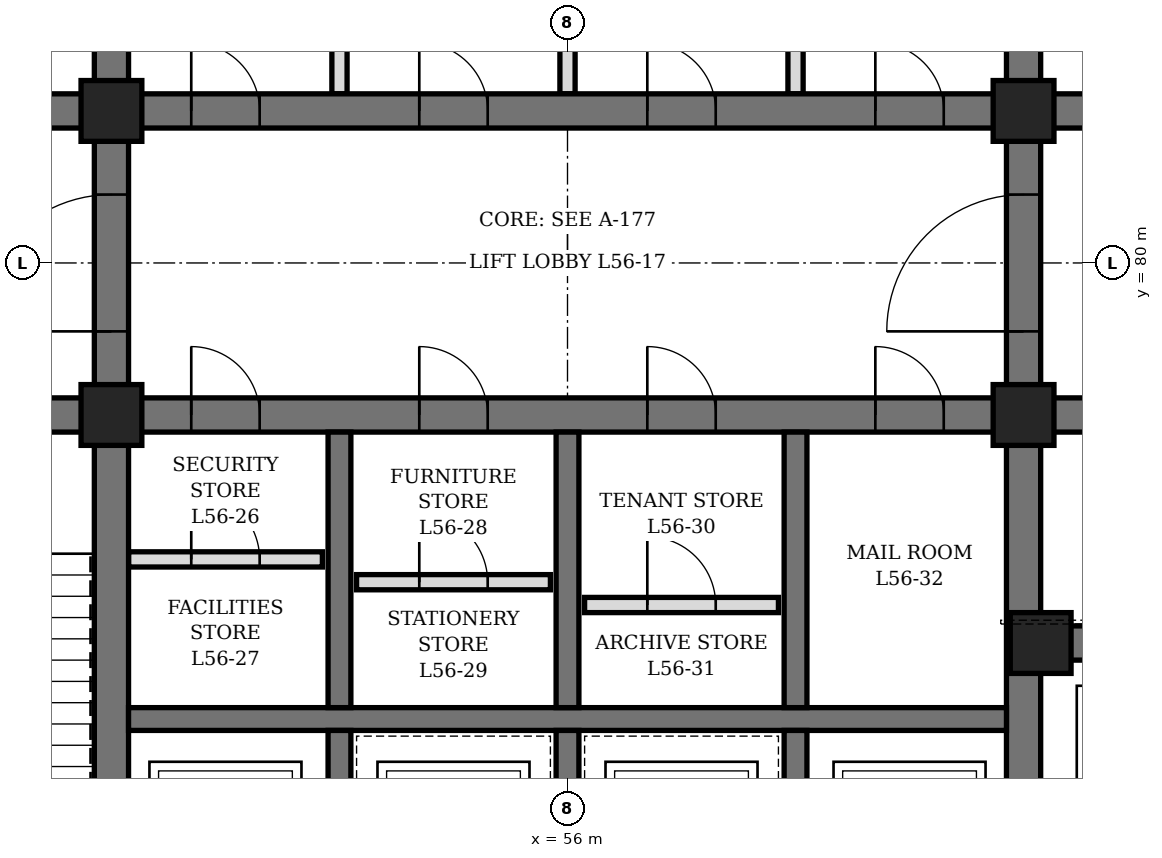
"""IFC4 building model, lengths in metres.
Left out: names, types, materials, properties, quantities, classifications, styles, units other than length and angle.
Written with IfcOpenShell. Run it as: python <this file> out.ifc"""

import sys

from ifc_helpers import new_model, si_unit, direction, frame, frame_2d, origin, origin_2d, place, context, subcontext, project, spatial, rectangle, hollow_rectangle, extrude, element, fill, save


model = new_model("IFC4")
c1 = context("Model", 3, precision=1e-05, world=origin(), true_north=direction((0.0, 1.0)))
c2 = subcontext(c1, "Body", "Model", "MODEL_VIEW")
j1 = project(units=[si_unit("LENGTHUNIT", "METRE"), si_unit("PLANEANGLEUNIT", "RADIAN")], contexts=[c1])
p1 = place(None, origin())
s1 = spatial("IfcSite", under=j1, at=p1, CompositionType="ELEMENT")
p2 = place(p1, origin())
s2 = spatial("IfcBuilding", under=s1, at=p2, CompositionType="ELEMENT")
p3 = place(p2, frame((0.0, 0.0, 250.3)))
s3 = spatial("IfcBuildingStorey", under=s2, at=p3, CompositionType="ELEMENT", Elevation=250.3)
p4 = place(p3, frame((50.0, 71.6, 0.0), z_axis=(0.0, 0.0, 1.0), x_axis=(0.0, 1.0, 0.0)))
e1 = element("IfcWall", 1, at=p4, inside=s3, PredefinedType="SHEAR", context=c2, shape_type="SweptSolid", body=[
    extrude(rectangle(XDim=16.8, YDim=0.45, at=frame_2d((8.4, 0.0))), origin(), (0.0, 0.0, 1.0), 4.2),
])
p5 = place(p4, frame((7.5, 0.0, 0.0)))
e2 = element("IfcOpeningElement", 2, at=p5, cuts=e1, PredefinedType="OPENING", context=c2, shape_type="SweptSolid", body=[
    extrude(rectangle(XDim=1.8, YDim=2.4, at=frame_2d((0.9, 1.2))), frame((0.0, 0.235, 0.0), z_axis=(0.0, -1.0, 0.0), x_axis=(1.0, 0.0, 0.0)), (0.0, 0.0, 1.0), 0.47),
])
p6 = place(p3, frame((62.0, 71.6, 0.0), z_axis=(0.0, 0.0, 1.0), x_axis=(0.0, 1.0, 0.0)))
e3 = element("IfcWall", 3, at=p6, inside=s3, PredefinedType="SHEAR", context=c2, shape_type="SweptSolid", body=[
    extrude(rectangle(XDim=16.8, YDim=0.45, at=frame_2d((8.4, 0.0))), origin(), (0.0, 0.0, 1.0), 4.2),
])
p7 = place(p6, frame((7.5, 0.0, 0.0)))
e4 = element("IfcOpeningElement", 4, at=p7, cuts=e3, PredefinedType="OPENING", context=c2, shape_type="SweptSolid", body=[
    extrude(rectangle(XDim=1.8, YDim=2.4, at=frame_2d((0.9, 1.2))), frame((0.0, 0.235, 0.0), z_axis=(0.0, -1.0, 0.0), x_axis=(1.0, 0.0, 0.0)), (0.0, 0.0, 1.0), 0.47),
])
p8 = place(p3, frame((44.6, 78.0, 0.0), z_axis=(0.0, 0.0, 1.0), x_axis=(1.0, 0.0, 0.0)))
e5 = element("IfcWall", 5, at=p8, inside=s3, PredefinedType="SHEAR", context=c2, shape_type="SweptSolid", body=[
    extrude(rectangle(XDim=5.175, YDim=0.45, at=frame_2d((2.587, 0.0))), origin(), (0.0, 0.0, 1.0), 4.2),
])
p9 = place(p8, frame((1.8, 0.0, 0.0)))
e6 = element("IfcOpeningElement", 6, at=p9, cuts=e5, PredefinedType="OPENING", context=c2, shape_type="SweptSolid", body=[
    extrude(rectangle(XDim=1.2, YDim=2.1, at=frame_2d((0.6, 1.05))), frame((0.0, 0.235, 0.0), z_axis=(0.0, -1.0, 0.0), x_axis=(1.0, 0.0, 0.0)), (0.0, 0.0, 1.0), 0.47),
])
p10 = place(p3, frame((44.6, 82.0, 0.0), z_axis=(0.0, 0.0, 1.0), x_axis=(1.0, 0.0, 0.0)))
e7 = element("IfcWall", 7, at=p10, inside=s3, PredefinedType="SHEAR", context=c2, shape_type="SweptSolid", body=[
    extrude(rectangle(XDim=5.175, YDim=0.45, at=frame_2d((2.587, 0.0))), origin(), (0.0, 0.0, 1.0), 4.2),
])
p11 = place(p10, frame((0.7, 0.0, 0.0)))
e8 = element("IfcOpeningElement", 8, at=p11, cuts=e7, PredefinedType="OPENING", context=c2, shape_type="SweptSolid", body=[
    extrude(rectangle(XDim=0.9, YDim=2.1, at=frame_2d((0.45, 1.05))), frame((0.0, 0.235, 0.0), z_axis=(0.0, -1.0, 0.0), x_axis=(1.0, 0.0, 0.0)), (0.0, 0.0, 1.0), 0.47),
])
p12 = place(p3, frame((62.225, 75.0, 0.0), z_axis=(0.0, 0.0, 1.0), x_axis=(1.0, 0.0, 0.0)))
e9 = element("IfcWall", 9, at=p12, inside=s3, PredefinedType="SHEAR", context=c2, shape_type="SweptSolid", body=[
    extrude(rectangle(XDim=5.175, YDim=0.45, at=frame_2d((2.587, 0.0))), origin(), (0.0, 0.0, 1.0), 4.2),
])
p13 = place(p12, frame((0.675, 0.0, 0.0)))
e10 = element("IfcOpeningElement", 10, at=p13, cuts=e9, PredefinedType="OPENING", context=c2, shape_type="SweptSolid", body=[
    extrude(rectangle(XDim=1.2, YDim=2.2, at=frame_2d((0.6, 1.1))), frame((0.0, 0.235, 0.0), z_axis=(0.0, -1.0, 0.0), x_axis=(1.0, 0.0, 0.0)), (0.0, 0.0, 1.0), 0.47),
])
p14 = place(p12, frame((3.425, 0.0, 0.0)))
e11 = element("IfcOpeningElement", 11, at=p14, cuts=e9, PredefinedType="OPENING", context=c2, shape_type="SweptSolid", body=[
    extrude(rectangle(XDim=1.2, YDim=2.2, at=frame_2d((0.6, 1.1))), frame((0.0, 0.235, 0.0), z_axis=(0.0, -1.0, 0.0), x_axis=(1.0, 0.0, 0.0)), (0.0, 0.0, 1.0), 0.47),
])
p15 = place(p3, frame((62.225, 78.0, 0.0), z_axis=(0.0, 0.0, 1.0), x_axis=(1.0, 0.0, 0.0)))
e12 = element("IfcWall", 12, at=p15, inside=s3, PredefinedType="SHEAR", context=c2, shape_type="SweptSolid", body=[
    extrude(rectangle(XDim=5.175, YDim=0.45, at=frame_2d((2.587, 0.0))), origin(), (0.0, 0.0, 1.0), 4.2),
])
p16 = place(p15, frame((2.175, 0.0, 0.0)))
e13 = element("IfcOpeningElement", 13, at=p16, cuts=e12, PredefinedType="OPENING", context=c2, shape_type="SweptSolid", body=[
    extrude(rectangle(XDim=1.2, YDim=2.1, at=frame_2d((0.6, 1.05))), frame((0.0, 0.235, 0.0), z_axis=(0.0, -1.0, 0.0), x_axis=(1.0, 0.0, 0.0)), (0.0, 0.0, 1.0), 0.47),
])
p17 = place(p3, frame((62.225, 82.0, 0.0), z_axis=(0.0, 0.0, 1.0), x_axis=(1.0, 0.0, 0.0)))
e14 = element("IfcWall", 14, at=p17, inside=s3, PredefinedType="SHEAR", context=c2, shape_type="SweptSolid", body=[
    extrude(rectangle(XDim=5.175, YDim=0.45, at=frame_2d((2.587, 0.0))), origin(), (0.0, 0.0, 1.0), 4.2),
])
p18 = place(p17, frame((2.175, 0.0, 0.0)))
e15 = element("IfcOpeningElement", 15, at=p18, cuts=e14, PredefinedType="OPENING", context=c2, shape_type="SweptSolid", body=[
    extrude(rectangle(XDim=1.2, YDim=2.1, at=frame_2d((0.6, 1.05))), frame((0.0, 0.235, 0.0), z_axis=(0.0, -1.0, 0.0), x_axis=(1.0, 0.0, 0.0)), (0.0, 0.0, 1.0), 0.47),
])
p19 = place(p3, frame((50.225, 78.0, 0.0), z_axis=(0.0, 0.0, 1.0), x_axis=(1.0, 0.0, 0.0)))
e16 = element("IfcWall", 16, at=p19, inside=s3, PredefinedType="SHEAR", context=c2, shape_type="SweptSolid", body=[
    extrude(rectangle(XDim=11.55, YDim=0.45, at=frame_2d((5.775, 0.0))), origin(), (0.0, 0.0, 1.0), 4.2),
])
p20 = place(p19, frame((0.825, 0.0, 0.0)))
e17 = element("IfcOpeningElement", 17, at=p20, cuts=e16, PredefinedType="OPENING", context=c2, shape_type="SweptSolid", body=[
    extrude(rectangle(XDim=0.9, YDim=2.1, at=frame_2d((0.45, 1.05))), frame((0.0, 0.235, 0.0), z_axis=(0.0, -1.0, 0.0), x_axis=(1.0, 0.0, 0.0)), (0.0, 0.0, 1.0), 0.47),
])
p21 = place(p19, frame((3.825, 0.0, 0.0)))
e18 = element("IfcOpeningElement", 18, at=p21, cuts=e16, PredefinedType="OPENING", context=c2, shape_type="SweptSolid", body=[
    extrude(rectangle(XDim=0.9, YDim=2.1, at=frame_2d((0.45, 1.05))), frame((0.0, 0.235, 0.0), z_axis=(0.0, -1.0, 0.0), x_axis=(1.0, 0.0, 0.0)), (0.0, 0.0, 1.0), 0.47),
])
p22 = place(p19, frame((6.825, 0.0, 0.0)))
e19 = element("IfcOpeningElement", 19, at=p22, cuts=e16, PredefinedType="OPENING", context=c2, shape_type="SweptSolid", body=[
    extrude(rectangle(XDim=0.9, YDim=2.1, at=frame_2d((0.45, 1.05))), frame((0.0, 0.235, 0.0), z_axis=(0.0, -1.0, 0.0), x_axis=(1.0, 0.0, 0.0)), (0.0, 0.0, 1.0), 0.47),
])
p23 = place(p19, frame((9.825, 0.0, 0.0)))
e20 = element("IfcOpeningElement", 20, at=p23, cuts=e16, PredefinedType="OPENING", context=c2, shape_type="SweptSolid", body=[
    extrude(rectangle(XDim=0.9, YDim=2.1, at=frame_2d((0.45, 1.05))), frame((0.0, 0.235, 0.0), z_axis=(0.0, -1.0, 0.0), x_axis=(1.0, 0.0, 0.0)), (0.0, 0.0, 1.0), 0.47),
])
p24 = place(p3, frame((50.225, 82.0, 0.0), z_axis=(0.0, 0.0, 1.0), x_axis=(1.0, 0.0, 0.0)))
e21 = element("IfcWall", 21, at=p24, inside=s3, PredefinedType="SHEAR", context=c2, shape_type="SweptSolid", body=[
    extrude(rectangle(XDim=11.55, YDim=0.45, at=frame_2d((5.775, 0.0))), origin(), (0.0, 0.0, 1.0), 4.2),
])
p25 = place(p24, frame((0.825, 0.0, 0.0)))
e22 = element("IfcOpeningElement", 22, at=p25, cuts=e21, PredefinedType="OPENING", context=c2, shape_type="SweptSolid", body=[
    extrude(rectangle(XDim=0.9, YDim=2.1, at=frame_2d((0.45, 1.05))), frame((0.0, 0.235, 0.0), z_axis=(0.0, -1.0, 0.0), x_axis=(1.0, 0.0, 0.0)), (0.0, 0.0, 1.0), 0.47),
])
p26 = place(p24, frame((3.825, 0.0, 0.0)))
e23 = element("IfcOpeningElement", 23, at=p26, cuts=e21, PredefinedType="OPENING", context=c2, shape_type="SweptSolid", body=[
    extrude(rectangle(XDim=0.9, YDim=2.1, at=frame_2d((0.45, 1.05))), frame((0.0, 0.235, 0.0), z_axis=(0.0, -1.0, 0.0), x_axis=(1.0, 0.0, 0.0)), (0.0, 0.0, 1.0), 0.47),
])
p27 = place(p24, frame((6.825, 0.0, 0.0)))
e24 = element("IfcOpeningElement", 24, at=p27, cuts=e21, PredefinedType="OPENING", context=c2, shape_type="SweptSolid", body=[
    extrude(rectangle(XDim=0.9, YDim=2.1, at=frame_2d((0.45, 1.05))), frame((0.0, 0.235, 0.0), z_axis=(0.0, -1.0, 0.0), x_axis=(1.0, 0.0, 0.0)), (0.0, 0.0, 1.0), 0.47),
])
p28 = place(p24, frame((9.825, 0.0, 0.0)))
e25 = element("IfcOpeningElement", 25, at=p28, cuts=e21, PredefinedType="OPENING", context=c2, shape_type="SweptSolid", body=[
    extrude(rectangle(XDim=0.9, YDim=2.1, at=frame_2d((0.45, 1.05))), frame((0.0, 0.235, 0.0), z_axis=(0.0, -1.0, 0.0), x_axis=(1.0, 0.0, 0.0)), (0.0, 0.0, 1.0), 0.47),
])
p29 = place(p3, frame((50.225, 74.0, 0.0), z_axis=(0.0, 0.0, 1.0), x_axis=(1.0, 0.0, 0.0)))
e26 = element("IfcWall", 26, at=p29, inside=s3, PredefinedType="SHEAR", context=c2, shape_type="SweptSolid", body=[
    extrude(rectangle(XDim=11.55, YDim=0.3, at=frame_2d((5.775, 0.0))), origin(), (0.0, 0.0, 1.0), 4.2),
])
p30 = place(p3, frame((53.0, 71.6, 0.0), z_axis=(0.0, 0.0, 1.0), x_axis=(0.0, 1.0, 0.0)))
e27 = element("IfcWall", 27, at=p30, inside=s3, PredefinedType="SHEAR", context=c2, shape_type="SweptSolid", body=[
    extrude(rectangle(XDim=2.25, YDim=0.3, at=frame_2d((1.125, 0.0))), origin(), (0.0, 0.0, 1.0), 4.2),
])
p31 = place(p3, frame((53.0, 74.15, 0.0), z_axis=(0.0, 0.0, 1.0), x_axis=(0.0, 1.0, 0.0)))
e28 = element("IfcWall", 28, at=p31, inside=s3, PredefinedType="SHEAR", context=c2, shape_type="SweptSolid", body=[
    extrude(rectangle(XDim=3.625, YDim=0.3, at=frame_2d((1.812, 0.0))), origin(), (0.0, 0.0, 1.0), 4.2),
])
p32 = place(p3, frame((56.0, 71.6, 0.0), z_axis=(0.0, 0.0, 1.0), x_axis=(0.0, 1.0, 0.0)))
e29 = element("IfcWall", 29, at=p32, inside=s3, PredefinedType="SHEAR", context=c2, shape_type="SweptSolid", body=[
    extrude(rectangle(XDim=2.25, YDim=0.3, at=frame_2d((1.125, 0.0))), origin(), (0.0, 0.0, 1.0), 4.2),
])
p33 = place(p3, frame((56.0, 74.15, 0.0), z_axis=(0.0, 0.0, 1.0), x_axis=(0.0, 1.0, 0.0)))
e30 = element("IfcWall", 30, at=p33, inside=s3, PredefinedType="SHEAR", context=c2, shape_type="SweptSolid", body=[
    extrude(rectangle(XDim=3.625, YDim=0.3, at=frame_2d((1.812, 0.0))), origin(), (0.0, 0.0, 1.0), 4.2),
])
p34 = place(p3, frame((59.0, 71.6, 0.0), z_axis=(0.0, 0.0, 1.0), x_axis=(0.0, 1.0, 0.0)))
e31 = element("IfcWall", 31, at=p34, inside=s3, PredefinedType="SHEAR", context=c2, shape_type="SweptSolid", body=[
    extrude(rectangle(XDim=2.25, YDim=0.3, at=frame_2d((1.125, 0.0))), origin(), (0.0, 0.0, 1.0), 4.2),
])
p35 = place(p3, frame((59.0, 74.15, 0.0), z_axis=(0.0, 0.0, 1.0), x_axis=(0.0, 1.0, 0.0)))
e32 = element("IfcWall", 32, at=p35, inside=s3, PredefinedType="SHEAR", context=c2, shape_type="SweptSolid", body=[
    extrude(rectangle(XDim=3.625, YDim=0.3, at=frame_2d((1.812, 0.0))), origin(), (0.0, 0.0, 1.0), 4.2),
])
for number, where, z_axis, x_axis in (
    (33, (50.0, 78.0, 0.0), (0.0, 0.0, 1.0), (1.0, 0.0, 0.0)),
    (34, (50.0, 82.0, 0.0), (0.0, 0.0, 1.0), (1.0, 0.0, 0.0)),
    (35, (62.0, 78.0, 0.0), (0.0, 0.0, 1.0), (1.0, 0.0, 0.0)),
    (36, (62.0, 82.0, 0.0), (0.0, 0.0, 1.0), (1.0, 0.0, 0.0)),
    (37, (62.225, 75.0, 0.0), (0.0, 0.0, 1.0), (1.0, 0.0, 0.0)),
):
    element("IfcColumn", number, at=place(p3, frame(where, z_axis=z_axis, x_axis=x_axis)), inside=s3, PredefinedType="COLUMN", context=c2, shape_type="SweptSolid", body=[
        extrude(hollow_rectangle(XDim=0.8, YDim=0.8, WallThickness=0.1, at=origin_2d()), origin(), (0.0, 0.0, 1.0), 4.2),
    ])
p36 = place(p3, frame((50.225, 76.1, 0.0), z_axis=(0.0, 0.0, 1.0), x_axis=(1.0, 0.0, 0.0)))
e38 = element("IfcWall", 38, at=p36, inside=s3, PredefinedType="PARTITIONING", context=c2, shape_type="SweptSolid", body=[
    extrude(rectangle(XDim=2.55, YDim=0.2, at=frame_2d((1.275, 0.0))), origin(), (0.0, 0.0, 1.0), 4.04),
])
p37 = place(p36, frame((0.825, 0.0, 0.0)))
e39 = element("IfcOpeningElement", 39, at=p37, cuts=e38, PredefinedType="OPENING", context=c2, shape_type="SweptSolid", body=[
    extrude(rectangle(XDim=0.9, YDim=2.1, at=frame_2d((0.45, 1.05))), frame((0.0, 0.11, 0.0), z_axis=(0.0, -1.0, 0.0), x_axis=(1.0, 0.0, 0.0)), (0.0, 0.0, 1.0), 0.22),
])
p38 = place(p3, frame((53.225, 75.8, 0.0), z_axis=(0.0, 0.0, 1.0), x_axis=(1.0, 0.0, 0.0)))
e40 = element("IfcWall", 40, at=p38, inside=s3, PredefinedType="PARTITIONING", context=c2, shape_type="SweptSolid", body=[
    extrude(rectangle(XDim=2.55, YDim=0.2, at=frame_2d((1.275, 0.0))), origin(), (0.0, 0.0, 1.0), 4.04),
])
p39 = place(p38, frame((0.825, 0.0, 0.0)))
e41 = element("IfcOpeningElement", 41, at=p39, cuts=e40, PredefinedType="OPENING", context=c2, shape_type="SweptSolid", body=[
    extrude(rectangle(XDim=0.9, YDim=2.1, at=frame_2d((0.45, 1.05))), frame((0.0, 0.11, 0.0), z_axis=(0.0, -1.0, 0.0), x_axis=(1.0, 0.0, 0.0)), (0.0, 0.0, 1.0), 0.22),
])
p40 = place(p3, frame((56.225, 75.5, 0.0), z_axis=(0.0, 0.0, 1.0), x_axis=(1.0, 0.0, 0.0)))
e42 = element("IfcWall", 42, at=p40, inside=s3, PredefinedType="PARTITIONING", context=c2, shape_type="SweptSolid", body=[
    extrude(rectangle(XDim=2.55, YDim=0.2, at=frame_2d((1.275, 0.0))), origin(), (0.0, 0.0, 1.0), 4.04),
])
p41 = place(p40, frame((0.825, 0.0, 0.0)))
e43 = element("IfcOpeningElement", 43, at=p41, cuts=e42, PredefinedType="OPENING", context=c2, shape_type="SweptSolid", body=[
    extrude(rectangle(XDim=0.9, YDim=2.1, at=frame_2d((0.45, 1.05))), frame((0.0, 0.11, 0.0), z_axis=(0.0, -1.0, 0.0), x_axis=(1.0, 0.0, 0.0)), (0.0, 0.0, 1.0), 0.22),
])
p42 = place(p3, frame((53.0, 82.225, 0.0), z_axis=(0.0, 0.0, 1.0), x_axis=(0.0, 1.0, 0.0)))
e44 = element("IfcWall", 44, at=p42, inside=s3, PredefinedType="PARTITIONING", context=c2, shape_type="SweptSolid", body=[
    extrude(rectangle(XDim=3.55, YDim=0.2, at=frame_2d((1.775, 0.0))), origin(), (0.0, 0.0, 1.0), 4.04),
])
p43 = place(p3, frame((56.0, 82.225, 0.0), z_axis=(0.0, 0.0, 1.0), x_axis=(0.0, 1.0, 0.0)))
e45 = element("IfcWall", 45, at=p43, inside=s3, PredefinedType="PARTITIONING", context=c2, shape_type="SweptSolid", body=[
    extrude(rectangle(XDim=3.55, YDim=0.2, at=frame_2d((1.775, 0.0))), origin(), (0.0, 0.0, 1.0), 3.14),
])
p44 = place(p3, frame((59.0, 82.225, 0.0), z_axis=(0.0, 0.0, 1.0), x_axis=(0.0, 1.0, 0.0)))
e46 = element("IfcWall", 46, at=p44, inside=s3, PredefinedType="PARTITIONING", context=c2, shape_type="SweptSolid", body=[
    extrude(rectangle(XDim=3.55, YDim=0.2, at=frame_2d((1.775, 0.0))), origin(), (0.0, 0.0, 1.0), 4.04),
])
p45 = place(p20, origin())
e47 = element("IfcDoor", 47, at=p45, inside=s3, OperationType="SINGLE_SWING_LEFT", PredefinedType="DOOR", context=c2, shape_type="SweptSolid", body=[
    extrude(rectangle(XDim=0.9, YDim=2.1, at=frame_2d((0.45, 1.05))), frame((0.0, 0.225, 0.0), z_axis=(0.0, -1.0, 0.0), x_axis=(1.0, 0.0, 0.0)), (0.0, 0.0, 1.0), 0.449),
])
fill(e17, e47)
p46 = place(p37, origin())
e48 = element("IfcDoor", 48, at=p46, inside=s3, OperationType="SINGLE_SWING_LEFT", PredefinedType="DOOR", context=c2, shape_type="SweptSolid", body=[
    extrude(rectangle(XDim=0.9, YDim=2.1, at=frame_2d((0.45, 1.05))), frame((0.0, 0.1, 0.0), z_axis=(0.0, -1.0, 0.0), x_axis=(1.0, 0.0, 0.0)), (0.0, 0.0, 1.0), 0.199),
])
fill(e39, e48)
p47 = place(p21, origin())
e49 = element("IfcDoor", 49, at=p47, inside=s3, OperationType="SINGLE_SWING_LEFT", PredefinedType="DOOR", context=c2, shape_type="SweptSolid", body=[
    extrude(rectangle(XDim=0.9, YDim=2.1, at=frame_2d((0.45, 1.05))), frame((0.0, 0.225, 0.0), z_axis=(0.0, -1.0, 0.0), x_axis=(1.0, 0.0, 0.0)), (0.0, 0.0, 1.0), 0.449),
])
fill(e18, e49)
p48 = place(p39, origin())
e50 = element("IfcDoor", 50, at=p48, inside=s3, OperationType="SINGLE_SWING_LEFT", PredefinedType="DOOR", context=c2, shape_type="SweptSolid", body=[
    extrude(rectangle(XDim=0.9, YDim=2.1, at=frame_2d((0.45, 1.05))), frame((0.0, 0.1, 0.0), z_axis=(0.0, -1.0, 0.0), x_axis=(1.0, 0.0, 0.0)), (0.0, 0.0, 1.0), 0.199),
])
fill(e41, e50)
p49 = place(p22, origin())
e51 = element("IfcDoor", 51, at=p49, inside=s3, OperationType="SINGLE_SWING_LEFT", PredefinedType="DOOR", context=c2, shape_type="SweptSolid", body=[
    extrude(rectangle(XDim=0.9, YDim=2.1, at=frame_2d((0.45, 1.05))), frame((0.0, 0.225, 0.0), z_axis=(0.0, -1.0, 0.0), x_axis=(1.0, 0.0, 0.0)), (0.0, 0.0, 1.0), 0.449),
])
fill(e19, e51)
p50 = place(p41, origin())
e52 = element("IfcDoor", 52, at=p50, inside=s3, OperationType="SINGLE_SWING_LEFT", PredefinedType="DOOR", context=c2, shape_type="SweptSolid", body=[
    extrude(rectangle(XDim=0.9, YDim=2.1, at=frame_2d((0.45, 1.05))), frame((0.0, 0.1, 0.0), z_axis=(0.0, -1.0, 0.0), x_axis=(1.0, 0.0, 0.0)), (0.0, 0.0, 1.0), 0.199),
])
fill(e43, e52)
p51 = place(p23, origin())
e53 = element("IfcDoor", 53, at=p51, inside=s3, OperationType="SINGLE_SWING_LEFT", PredefinedType="DOOR", context=c2, shape_type="SweptSolid", body=[
    extrude(rectangle(XDim=0.9, YDim=2.1, at=frame_2d((0.45, 1.05))), frame((0.0, 0.225, 0.0), z_axis=(0.0, -1.0, 0.0), x_axis=(1.0, 0.0, 0.0)), (0.0, 0.0, 1.0), 0.449),
])
fill(e20, e53)
p52 = place(p25, origin())
e54 = element("IfcDoor", 54, at=p52, inside=s3, OperationType="SINGLE_SWING_LEFT", PredefinedType="DOOR", context=c2, shape_type="SweptSolid", body=[
    extrude(rectangle(XDim=0.9, YDim=2.1, at=frame_2d((0.45, 1.05))), frame((0.0, 0.225, 0.0), z_axis=(0.0, -1.0, 0.0), x_axis=(1.0, 0.0, 0.0)), (0.0, 0.0, 1.0), 0.449),
])
fill(e22, e54)
p53 = place(p26, origin())
e55 = element("IfcDoor", 55, at=p53, inside=s3, OperationType="SINGLE_SWING_LEFT", PredefinedType="DOOR", context=c2, shape_type="SweptSolid", body=[
    extrude(rectangle(XDim=0.9, YDim=2.1, at=frame_2d((0.45, 1.05))), frame((0.0, 0.225, 0.0), z_axis=(0.0, -1.0, 0.0), x_axis=(1.0, 0.0, 0.0)), (0.0, 0.0, 1.0), 0.449),
])
fill(e23, e55)
p54 = place(p27, origin())
e56 = element("IfcDoor", 56, at=p54, inside=s3, OperationType="SINGLE_SWING_LEFT", PredefinedType="DOOR", context=c2, shape_type="SweptSolid", body=[
    extrude(rectangle(XDim=0.9, YDim=2.1, at=frame_2d((0.45, 1.05))), frame((0.0, 0.225, 0.0), z_axis=(0.0, -1.0, 0.0), x_axis=(1.0, 0.0, 0.0)), (0.0, 0.0, 1.0), 0.449),
])
fill(e24, e56)
p55 = place(p28, origin())
e57 = element("IfcDoor", 57, at=p55, inside=s3, OperationType="SINGLE_SWING_LEFT", PredefinedType="DOOR", context=c2, shape_type="SweptSolid", body=[
    extrude(rectangle(XDim=0.9, YDim=2.1, at=frame_2d((0.45, 1.05))), frame((0.0, 0.225, 0.0), z_axis=(0.0, -1.0, 0.0), x_axis=(1.0, 0.0, 0.0)), (0.0, 0.0, 1.0), 0.449),
])
fill(e25, e57)
p56 = place(p5, origin())
e58 = element("IfcDoor", 58, at=p56, inside=s3, OperationType="DOUBLE_DOOR_SINGLE_SWING", PredefinedType="DOOR", context=c2, shape_type="SweptSolid", body=[
    extrude(rectangle(XDim=1.8, YDim=2.4, at=frame_2d((0.9, 1.2))), frame((0.0, 0.225, 0.0), z_axis=(0.0, -1.0, 0.0), x_axis=(1.0, 0.0, 0.0)), (0.0, 0.0, 1.0), 0.449),
])
fill(e2, e58)
p57 = place(p7, origin())
e59 = element("IfcDoor", 59, at=p57, inside=s3, OperationType="DOUBLE_DOOR_SINGLE_SWING", PredefinedType="DOOR", context=c2, shape_type="SweptSolid", body=[
    extrude(rectangle(XDim=1.8, YDim=2.4, at=frame_2d((0.9, 1.2))), frame((0.0, 0.225, 0.0), z_axis=(0.0, -1.0, 0.0), x_axis=(1.0, 0.0, 0.0)), (0.0, 0.0, 1.0), 0.449),
])
fill(e4, e59)
save(model, sys.argv[1])
